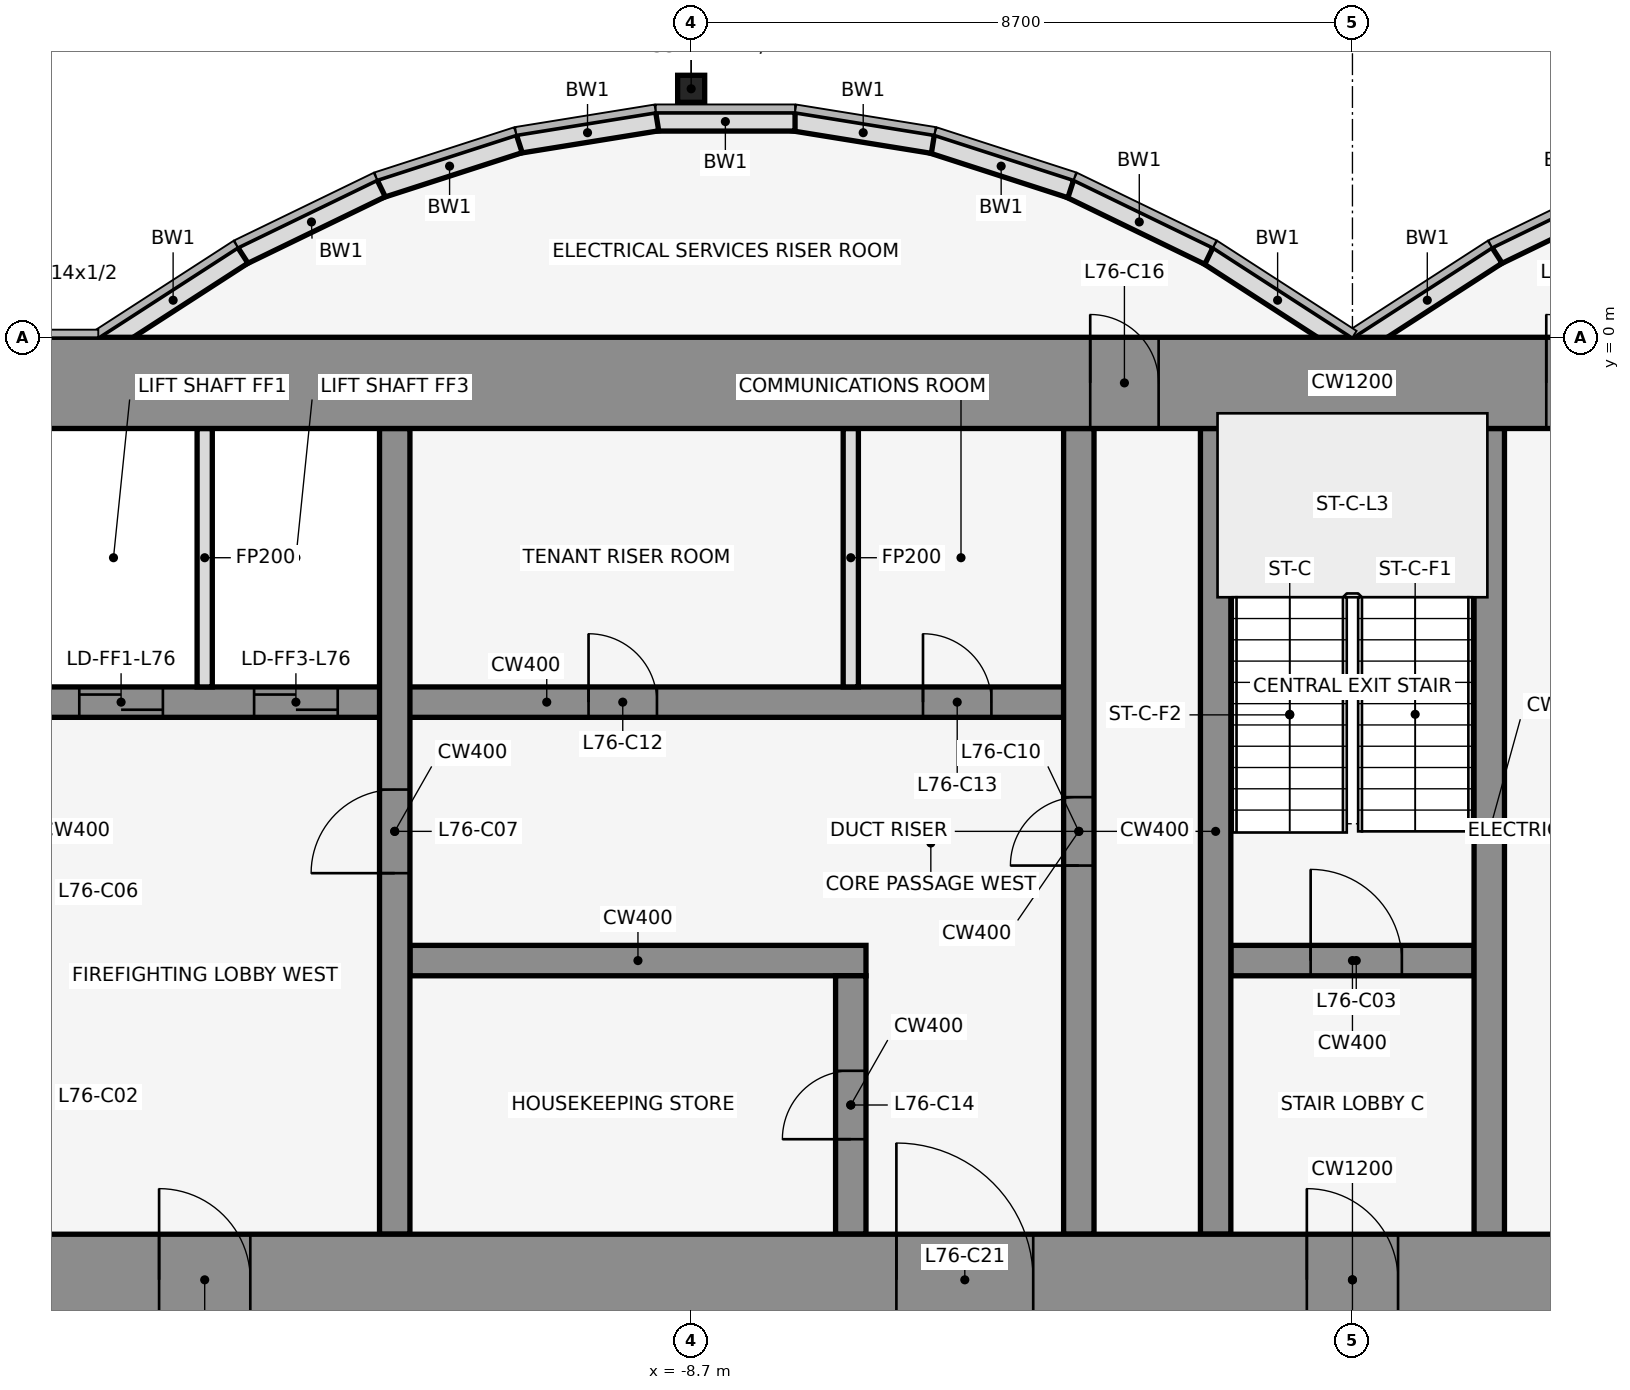
"""IFC4 building model, lengths in metres.
Left out: names, types, materials, properties, quantities, classifications, styles, units other than length and angle.
Written with IfcOpenShell. Run it as: python <this file> out.ifc"""

import sys

from ifc_helpers import new_model, si_unit, direction, frame, frame_2d, origin, origin_2d, place, context, subcontext, project, spatial, rectangle, hollow_rectangle, extrude, element, fill, save


model = new_model("IFC4")
c1 = context("Model", 3, precision=1e-05, world=origin(), true_north=direction((0.0, 1.0)))
c2 = subcontext(c1, "Body", "Model", "MODEL_VIEW")
j1 = project(units=[si_unit("LENGTHUNIT", "METRE"), si_unit("PLANEANGLEUNIT", "RADIAN")], contexts=[c1])
p1 = place(None, origin())
s1 = spatial("IfcSite", under=j1, at=p1, CompositionType="ELEMENT")
p2 = place(p1, origin())
s2 = spatial("IfcBuilding", under=s1, at=p2, CompositionType="ELEMENT")
p3 = place(p2, frame((0.0, 0.0, 338.0)))
s3 = spatial("IfcBuildingStorey", under=s2, at=p3, CompositionType="ELEMENT", Elevation=338.0)
p4 = place(p3, frame((-8.7, 3.269, 0.0), z_axis=(0.0, 0.0, 1.0), x_axis=(1.0, 0.0, 0.0)))
e1 = element("IfcColumn", 1, at=p4, inside=s3, PredefinedType="COLUMN", context=c2, shape_type="SweptSolid", body=[
    extrude(hollow_rectangle(XDim=0.356, YDim=0.356, WallThickness=0.012, at=origin_2d()), origin(), (0.0, 0.0, 1.0), 4.5),
])
p5 = place(p3, frame((3.721, 1.962, 0.0), z_axis=(0.0, 0.0, 1.0), x_axis=(-0.89982408427, -0.436252928206, 0.0)))
e2 = element("IfcWall", 2, at=p5, inside=s3, PredefinedType="STANDARD", context=c2, shape_type="SweptSolid", body=[
    extrude(rectangle(XDim=2.038, YDim=0.25, at=frame_2d((1.019, 0.0))), origin(), (0.0, 0.0, 1.0), 4.3),
])
for number, where, z_axis, x_axis in (
    (3, (1.901, 1.08, 0.0), (0.0, 0.0, 1.0), (-0.84, -0.543, 0.0)),
    (4, (-0.068, -0.105, 0.0), (0.0, 0.0, 1.0), (-0.84, 0.543, 0.0)),
):
    element("IfcWall", number, at=place(p3, frame(where, z_axis=z_axis, x_axis=x_axis)), inside=s3, PredefinedType="STANDARD", context=c2, shape_type="SweptSolid", body=[
        extrude(rectangle(XDim=2.183, YDim=0.25, at=frame_2d((1.091, 0.0))), origin(), (0.0, 0.0, 1.0), 4.3),
    ])
p6 = place(p3, frame((-1.888, 1.073, 0.0), z_axis=(0.0, 0.0, 1.0), x_axis=(-0.89982408427, 0.436252928206, 0.0)))
e5 = element("IfcWall", 5, at=p6, inside=s3, PredefinedType="STANDARD", context=c2, shape_type="SweptSolid", body=[
    extrude(rectangle(XDim=2.038, YDim=0.25, at=frame_2d((1.019, 0.0))), origin(), (0.0, 0.0, 1.0), 4.3),
])
p7 = place(p3, frame((-3.705, 1.955, 0.0), z_axis=(0.0, 0.0, 1.0), x_axis=(-0.951495806175, 0.307661714928, 0.0)))
e6 = element("IfcWall", 6, at=p7, inside=s3, PredefinedType="STANDARD", context=c2, shape_type="SweptSolid", body=[
    extrude(rectangle(XDim=1.927, YDim=0.25, at=frame_2d((0.963, 0.0))), origin(), (0.0, 0.0, 1.0), 4.3),
])
p8 = place(p3, frame((-5.52, 2.543, 0.0), z_axis=(0.0, 0.0, 1.0), x_axis=(-0.987181718931, 0.159600293885, 0.0)))
e7 = element("IfcWall", 7, at=p8, inside=s3, PredefinedType="STANDARD", context=c2, shape_type="SweptSolid", body=[
    extrude(rectangle(XDim=1.857, YDim=0.25, at=frame_2d((0.929, 0.0))), origin(), (0.0, 0.0, 1.0), 4.3),
])
p9 = place(p3, frame((-7.333, 2.838, 0.0), z_axis=(0.0, 0.0, 1.0), x_axis=(-1.0, 0.0, 0.0)))
e8 = element("IfcWall", 8, at=p9, inside=s3, PredefinedType="STANDARD", context=c2, shape_type="SweptSolid", body=[
    extrude(rectangle(XDim=1.833, YDim=0.25, at=frame_2d((0.917, 0.0))), origin(), (0.0, 0.0, 1.0), 4.3),
])
p10 = place(p3, frame((-9.147, 2.84, 0.0), z_axis=(0.0, 0.0, 1.0), x_axis=(-0.987181718931, -0.159600293885, 0.0)))
e9 = element("IfcWall", 9, at=p10, inside=s3, PredefinedType="STANDARD", context=c2, shape_type="SweptSolid", body=[
    extrude(rectangle(XDim=1.857, YDim=0.25, at=frame_2d((0.929, 0.0))), origin(), (0.0, 0.0, 1.0), 4.3),
])
p11 = place(p3, frame((-10.962, 2.548, 0.0), z_axis=(0.0, 0.0, 1.0), x_axis=(-0.951495806175, -0.307661714928, 0.0)))
e10 = element("IfcWall", 10, at=p11, inside=s3, PredefinedType="STANDARD", context=c2, shape_type="SweptSolid", body=[
    extrude(rectangle(XDim=1.927, YDim=0.25, at=frame_2d((0.963, 0.0))), origin(), (0.0, 0.0, 1.0), 4.3),
])
p12 = place(p3, frame((-12.779, 1.962, 0.0), z_axis=(0.0, 0.0, 1.0), x_axis=(-0.89982408427, -0.436252928206, 0.0)))
e11 = element("IfcWall", 11, at=p12, inside=s3, PredefinedType="STANDARD", context=c2, shape_type="SweptSolid", body=[
    extrude(rectangle(XDim=2.038, YDim=0.25, at=frame_2d((1.019, 0.0))), origin(), (0.0, 0.0, 1.0), 4.3),
])
p13 = place(p3, frame((-14.599, 1.08, 0.0), z_axis=(0.0, 0.0, 1.0), x_axis=(-0.83981312244, -0.542875602121, 0.0)))
e12 = element("IfcWall", 12, at=p13, inside=s3, PredefinedType="STANDARD", context=c2, shape_type="SweptSolid", body=[
    extrude(rectangle(XDim=2.183, YDim=0.25, at=frame_2d((1.091, 0.0))), origin(), (0.0, 0.0, 1.0), 4.3),
])
p14 = place(p3, frame((-12.4, -8.2, 0.0), z_axis=(0.0, 0.0, 1.0), x_axis=(1.0, 0.0, 0.0)))
e13 = element("IfcWall", 13, at=p14, inside=s3, PredefinedType="SHEAR", context=c2, shape_type="SweptSolid", body=[
    extrude(rectangle(XDim=6.0, YDim=0.4, at=frame_2d((3.0, 0.0))), origin(), (0.0, 0.0, 1.0), 4.5),
])
p15 = place(p3, frame((-1.6, -8.2, 0.0), z_axis=(0.0, 0.0, 1.0), x_axis=(1.0, 0.0, 0.0)))
e14 = element("IfcWall", 14, at=p15, inside=s3, PredefinedType="SHEAR", context=c2, shape_type="SweptSolid", body=[
    extrude(rectangle(XDim=3.2, YDim=0.4, at=frame_2d((1.6, 0.0))), origin(), (0.0, 0.0, 1.0), 4.5),
])
p16 = place(p15, frame((1.05, 0.0, 0.0)))
e15 = element("IfcOpeningElement", 15, at=p16, cuts=e14, PredefinedType="OPENING", context=c2, shape_type="SweptSolid", body=[
    extrude(rectangle(XDim=1.2, YDim=2.1, at=frame_2d((0.6, 1.05))), frame((0.0, 0.212, 0.0), z_axis=(0.0, -1.0, 0.0), x_axis=(1.0, 0.0, 0.0)), (0.0, 0.0, 1.0), 0.424),
])
p17 = place(p3, frame((-17.4, -4.8, 0.0), z_axis=(0.0, 0.0, 1.0), x_axis=(1.0, 0.0, 0.0)))
e16 = element("IfcWall", 16, at=p17, inside=s3, PredefinedType="SHEAR", context=c2, shape_type="SweptSolid", body=[
    extrude(rectangle(XDim=13.6, YDim=0.4, at=frame_2d((6.8, 0.0))), origin(), (0.0, 0.0, 1.0), 4.5),
])
p18 = place(p17, frame((0.65, 0.0, 0.0)))
e17 = element("IfcOpeningElement", 17, at=p18, cuts=e16, PredefinedType="OPENING", context=c2, shape_type="SweptSolid", body=[
    extrude(rectangle(XDim=1.1, YDim=2.1, at=frame_2d((0.55, 1.05))), frame((0.0, 0.212, 0.0), z_axis=(0.0, -1.0, 0.0), x_axis=(1.0, 0.0, 0.0)), (0.0, 0.0, 1.0), 0.424),
])
p19 = place(p17, frame((2.95, 0.0, 0.0)))
e18 = element("IfcOpeningElement", 18, at=p19, cuts=e16, PredefinedType="OPENING", context=c2, shape_type="SweptSolid", body=[
    extrude(rectangle(XDim=1.1, YDim=2.1, at=frame_2d((0.55, 1.05))), frame((0.0, 0.212, 0.0), z_axis=(0.0, -1.0, 0.0), x_axis=(1.0, 0.0, 0.0)), (0.0, 0.0, 1.0), 0.424),
])
p20 = place(p17, frame((7.35, 0.0, 0.0)))
e19 = element("IfcOpeningElement", 19, at=p20, cuts=e16, PredefinedType="OPENING", context=c2, shape_type="SweptSolid", body=[
    extrude(rectangle(XDim=0.9, YDim=2.1, at=frame_2d((0.45, 1.05))), frame((0.0, 0.212, 0.0), z_axis=(0.0, -1.0, 0.0), x_axis=(1.0, 0.0, 0.0)), (0.0, 0.0, 1.0), 0.424),
])
p21 = place(p17, frame((11.75, 0.0, 0.0)))
e20 = element("IfcOpeningElement", 20, at=p21, cuts=e16, PredefinedType="OPENING", context=c2, shape_type="SweptSolid", body=[
    extrude(rectangle(XDim=0.9, YDim=2.1, at=frame_2d((0.45, 1.05))), frame((0.0, 0.212, 0.0), z_axis=(0.0, -1.0, 0.0), x_axis=(1.0, 0.0, 0.0)), (0.0, 0.0, 1.0), 0.424),
])
p22 = place(p3, frame((-15.1, -4.6, 0.0), z_axis=(0.0, 0.0, 1.0), x_axis=(0.0, 1.0, 0.0)))
e21 = element("IfcWall", 21, at=p22, inside=s3, PredefinedType="PARTITIONING", context=c2, shape_type="SweptSolid", body=[
    extrude(rectangle(XDim=3.4, YDim=0.2, at=frame_2d((1.7, 0.0))), origin(), (0.0, 0.0, 1.0), 3.368),
])
p23 = place(p3, frame((-12.6, -11.8, 0.0), z_axis=(0.0, 0.0, 1.0), x_axis=(0.0, 1.0, 0.0)))
e22 = element("IfcWall", 22, at=p23, inside=s3, PredefinedType="SHEAR", context=c2, shape_type="SweptSolid", body=[
    extrude(rectangle(XDim=10.6, YDim=0.4, at=frame_2d((5.3, 0.0))), origin(), (0.0, 0.0, 1.0), 4.5),
])
p24 = place(p23, frame((4.75, 0.0, 0.0)))
e23 = element("IfcOpeningElement", 23, at=p24, cuts=e22, PredefinedType="OPENING", context=c2, shape_type="SweptSolid", body=[
    extrude(rectangle(XDim=1.1, YDim=2.1, at=frame_2d((0.55, 1.05))), frame((0.0, 0.212, 0.0), z_axis=(0.0, -1.0, 0.0), x_axis=(1.0, 0.0, 0.0)), (0.0, 0.0, 1.0), 0.424),
])
p25 = place(p3, frame((-6.6, -11.8, 0.0), z_axis=(0.0, 0.0, 1.0), x_axis=(0.0, 1.0, 0.0)))
e24 = element("IfcWall", 24, at=p25, inside=s3, PredefinedType="SHEAR", context=c2, shape_type="SweptSolid", body=[
    extrude(rectangle(XDim=3.4, YDim=0.4, at=frame_2d((1.7, 0.0))), origin(), (0.0, 0.0, 1.0), 4.5),
])
p26 = place(p25, frame((1.25, 0.0, 0.0)))
e25 = element("IfcOpeningElement", 25, at=p26, cuts=e24, PredefinedType="OPENING", context=c2, shape_type="SweptSolid", body=[
    extrude(rectangle(XDim=0.9, YDim=2.1, at=frame_2d((0.45, 1.05))), frame((0.0, 0.212, 0.0), z_axis=(0.0, -1.0, 0.0), x_axis=(1.0, 0.0, 0.0)), (0.0, 0.0, 1.0), 0.424),
])
p27 = place(p3, frame((-6.6, -4.6, 0.0), z_axis=(0.0, 0.0, 1.0), x_axis=(0.0, 1.0, 0.0)))
e26 = element("IfcWall", 26, at=p27, inside=s3, PredefinedType="PARTITIONING", context=c2, shape_type="SweptSolid", body=[
    extrude(rectangle(XDim=3.4, YDim=0.2, at=frame_2d((1.7, 0.0))), origin(), (0.0, 0.0, 1.0), 3.368),
])
p28 = place(p3, frame((-3.6, -11.8, 0.0), z_axis=(0.0, 0.0, 1.0), x_axis=(0.0, 1.0, 0.0)))
e27 = element("IfcWall", 27, at=p28, inside=s3, PredefinedType="SHEAR", context=c2, shape_type="SweptSolid", body=[
    extrude(rectangle(XDim=10.6, YDim=0.4, at=frame_2d((5.3, 0.0))), origin(), (0.0, 0.0, 1.0), 4.5),
])
p29 = place(p28, frame((4.85, 0.0, 0.0)))
e28 = element("IfcOpeningElement", 28, at=p29, cuts=e27, PredefinedType="OPENING", context=c2, shape_type="SweptSolid", body=[
    extrude(rectangle(XDim=0.9, YDim=2.1, at=frame_2d((0.45, 1.05))), frame((0.0, 0.212, 0.0), z_axis=(0.0, -1.0, 0.0), x_axis=(1.0, 0.0, 0.0)), (0.0, 0.0, 1.0), 0.424),
])
for number, where, z_axis, x_axis in (
    (29, (-1.8, -11.8, 0.0), (0.0, 0.0, 1.0), (0.0, 1.0, 0.0)),
    (30, (1.8, -11.8, 0.0), (0.0, 0.0, 1.0), (0.0, 1.0, 0.0)),
):
    element("IfcWall", number, at=place(p3, frame(where, z_axis=z_axis, x_axis=x_axis)), inside=s3, PredefinedType="SHEAR", context=c2, shape_type="SweptSolid", body=[
        extrude(rectangle(XDim=10.6, YDim=0.4, at=frame_2d((5.3, 0.0))), origin(), (0.0, 0.0, 1.0), 4.5),
    ])
p30 = place(p3, frame((-22.0, -0.6, 0.0), z_axis=(0.0, 0.0, 1.0), x_axis=(1.0, 0.0, 0.0)))
e31 = element("IfcWall", 31, at=p30, inside=s3, PredefinedType="SHEAR", context=c2, shape_type="SweptSolid", body=[
    extrude(rectangle(XDim=44.0, YDim=1.2, at=frame_2d((22.0, 0.0))), origin(), (0.0, 0.0, 1.0), 4.5),
])
p31 = place(p30, frame((18.55, 0.0, 0.0)))
e32 = element("IfcOpeningElement", 32, at=p31, cuts=e31, PredefinedType="OPENING", context=c2, shape_type="SweptSolid", body=[
    extrude(rectangle(XDim=0.9, YDim=2.1, at=frame_2d((0.45, 1.05))), frame((0.0, 0.612, 0.0), z_axis=(0.0, -1.0, 0.0), x_axis=(1.0, 0.0, 0.0)), (0.0, 0.0, 1.0), 1.224),
])
p32 = place(p30, frame((24.55, 0.0, 0.0)))
e33 = element("IfcOpeningElement", 33, at=p32, cuts=e31, PredefinedType="OPENING", context=c2, shape_type="SweptSolid", body=[
    extrude(rectangle(XDim=0.9, YDim=2.1, at=frame_2d((0.45, 1.05))), frame((0.0, 0.612, 0.0), z_axis=(0.0, -1.0, 0.0), x_axis=(1.0, 0.0, 0.0)), (0.0, 0.0, 1.0), 1.224),
])
p33 = place(p3, frame((-22.0, -12.4, 0.0), z_axis=(0.0, 0.0, 1.0), x_axis=(1.0, 0.0, 0.0)))
e34 = element("IfcWall", 34, at=p33, inside=s3, PredefinedType="SHEAR", context=c2, shape_type="SweptSolid", body=[
    extrude(rectangle(XDim=44.0, YDim=1.2, at=frame_2d((22.0, 0.0))), origin(), (0.0, 0.0, 1.0), 4.5),
])
p34 = place(p33, frame((2.2, 0.0, 0.0)))
e35 = element("IfcOpeningElement", 35, at=p34, cuts=e34, PredefinedType="OPENING", context=c2, shape_type="SweptSolid", body=[
    extrude(rectangle(XDim=1.2, YDim=2.1, at=frame_2d((0.6, 1.05))), frame((0.0, 0.612, 0.0), z_axis=(0.0, -1.0, 0.0), x_axis=(1.0, 0.0, 0.0)), (0.0, 0.0, 1.0), 1.224),
])
p35 = place(p33, frame((21.4, 0.0, 0.0)))
e36 = element("IfcOpeningElement", 36, at=p35, cuts=e34, PredefinedType="OPENING", context=c2, shape_type="SweptSolid", body=[
    extrude(rectangle(XDim=1.2, YDim=2.1, at=frame_2d((0.6, 1.05))), frame((0.0, 0.612, 0.0), z_axis=(0.0, -1.0, 0.0), x_axis=(1.0, 0.0, 0.0)), (0.0, 0.0, 1.0), 1.224),
])
p36 = place(p33, frame((40.6, 0.0, 0.0)))
e37 = element("IfcOpeningElement", 37, at=p36, cuts=e34, PredefinedType="OPENING", context=c2, shape_type="SweptSolid", body=[
    extrude(rectangle(XDim=1.2, YDim=2.1, at=frame_2d((0.6, 1.05))), frame((0.0, 0.612, 0.0), z_axis=(0.0, -1.0, 0.0), x_axis=(1.0, 0.0, 0.0)), (0.0, 0.0, 1.0), 1.224),
])
p37 = place(p33, frame((16.0, 0.0, 0.0)))
e38 = element("IfcOpeningElement", 38, at=p37, cuts=e34, PredefinedType="OPENING", context=c2, shape_type="SweptSolid", body=[
    extrude(rectangle(XDim=1.8, YDim=2.1, at=frame_2d((0.9, 1.05))), frame((0.0, 0.612, 0.0), z_axis=(0.0, -1.0, 0.0), x_axis=(1.0, 0.0, 0.0)), (0.0, 0.0, 1.0), 1.224),
])
p38 = place(p33, frame((6.3, 0.0, 0.0)))
e39 = element("IfcOpeningElement", 39, at=p38, cuts=e34, PredefinedType="OPENING", context=c2, shape_type="SweptSolid", body=[
    extrude(rectangle(XDim=1.2, YDim=2.1, at=frame_2d((0.6, 1.05))), frame((0.0, 0.612, 0.0), z_axis=(0.0, -1.0, 0.0), x_axis=(1.0, 0.0, 0.0)), (0.0, 0.0, 1.0), 1.224),
])
p39 = place(p33, frame((26.2, 0.0, 0.0)))
e40 = element("IfcOpeningElement", 40, at=p39, cuts=e34, PredefinedType="OPENING", context=c2, shape_type="SweptSolid", body=[
    extrude(rectangle(XDim=1.8, YDim=2.1, at=frame_2d((0.9, 1.05))), frame((0.0, 0.612, 0.0), z_axis=(0.0, -1.0, 0.0), x_axis=(1.0, 0.0, 0.0)), (0.0, 0.0, 1.0), 1.224),
])
p40 = place(p33, frame((36.5, 0.0, 0.0)))
e41 = element("IfcOpeningElement", 41, at=p40, cuts=e34, PredefinedType="OPENING", context=c2, shape_type="SweptSolid", body=[
    extrude(rectangle(XDim=1.2, YDim=2.1, at=frame_2d((0.6, 1.05))), frame((0.0, 0.612, 0.0), z_axis=(0.0, -1.0, 0.0), x_axis=(1.0, 0.0, 0.0)), (0.0, 0.0, 1.0), 1.224),
])
p41 = place(p16, origin())
e42 = element("IfcDoor", 42, at=p41, inside=s3, OperationType="SINGLE_SWING_LEFT", PredefinedType="DOOR", context=c2, shape_type="SweptSolid", body=[
    extrude(rectangle(XDim=1.2, YDim=2.1, at=frame_2d((0.6, 1.05))), frame((0.0, 0.025, 0.0), z_axis=(0.0, -1.0, 0.0), x_axis=(1.0, 0.0, 0.0)), (0.0, 0.0, 1.0), 0.05),
])
fill(e15, e42)
p42 = place(p18, origin())
e43 = element("IfcDoor", 43, at=p42, inside=s3, OperationType="DOUBLE_DOOR_SLIDING", PredefinedType="DOOR", context=c2, shape_type="SweptSolid", body=[
    extrude(rectangle(XDim=1.1, YDim=2.1, at=frame_2d((0.55, 1.05))), frame((0.0, 0.025, 0.0), z_axis=(0.0, -1.0, 0.0), x_axis=(1.0, 0.0, 0.0)), (0.0, 0.0, 1.0), 0.05),
])
fill(e17, e43)
p43 = place(p19, origin())
e44 = element("IfcDoor", 44, at=p43, inside=s3, OperationType="DOUBLE_DOOR_SLIDING", PredefinedType="DOOR", context=c2, shape_type="SweptSolid", body=[
    extrude(rectangle(XDim=1.1, YDim=2.1, at=frame_2d((0.55, 1.05))), frame((0.0, 0.025, 0.0), z_axis=(0.0, -1.0, 0.0), x_axis=(1.0, 0.0, 0.0)), (0.0, 0.0, 1.0), 0.05),
])
fill(e18, e44)
p44 = place(p24, origin())
e45 = element("IfcDoor", 45, at=p44, inside=s3, OperationType="SINGLE_SWING_LEFT", PredefinedType="DOOR", context=c2, shape_type="SweptSolid", body=[
    extrude(rectangle(XDim=1.1, YDim=2.1, at=frame_2d((0.55, 1.05))), frame((0.0, 0.025, 0.0), z_axis=(0.0, -1.0, 0.0), x_axis=(1.0, 0.0, 0.0)), (0.0, 0.0, 1.0), 0.05),
])
fill(e23, e45)
p45 = place(p29, frame((0.9, 0.0, 0.0), z_axis=(0.0, 0.0, 1.0), x_axis=(-1.0, 0.0, 0.0)))
e46 = element("IfcDoor", 46, at=p45, inside=s3, OperationType="SINGLE_SWING_LEFT", PredefinedType="DOOR", context=c2, shape_type="SweptSolid", body=[
    extrude(rectangle(XDim=0.9, YDim=2.1, at=frame_2d((0.45, 1.05))), frame((0.0, 0.025, 0.0), z_axis=(0.0, -1.0, 0.0), x_axis=(1.0, 0.0, 0.0)), (0.0, 0.0, 1.0), 0.05),
])
fill(e28, e46)
p46 = place(p20, origin())
e47 = element("IfcDoor", 47, at=p46, inside=s3, OperationType="SINGLE_SWING_RIGHT", PredefinedType="DOOR", context=c2, shape_type="SweptSolid", body=[
    extrude(rectangle(XDim=0.9, YDim=2.1, at=frame_2d((0.45, 1.05))), frame((0.0, 0.025, 0.0), z_axis=(0.0, -1.0, 0.0), x_axis=(1.0, 0.0, 0.0)), (0.0, 0.0, 1.0), 0.05),
])
fill(e19, e47)
p47 = place(p21, origin())
e48 = element("IfcDoor", 48, at=p47, inside=s3, OperationType="SINGLE_SWING_LEFT", PredefinedType="DOOR", context=c2, shape_type="SweptSolid", body=[
    extrude(rectangle(XDim=0.9, YDim=2.1, at=frame_2d((0.45, 1.05))), frame((0.0, 0.025, 0.0), z_axis=(0.0, -1.0, 0.0), x_axis=(1.0, 0.0, 0.0)), (0.0, 0.0, 1.0), 0.05),
])
fill(e20, e48)
p48 = place(p26, origin())
e49 = element("IfcDoor", 49, at=p48, inside=s3, OperationType="SINGLE_SWING_RIGHT", PredefinedType="DOOR", context=c2, shape_type="SweptSolid", body=[
    extrude(rectangle(XDim=0.9, YDim=2.1, at=frame_2d((0.45, 1.05))), frame((0.0, 0.025, 0.0), z_axis=(0.0, -1.0, 0.0), x_axis=(1.0, 0.0, 0.0)), (0.0, 0.0, 1.0), 0.05),
])
fill(e25, e49)
p49 = place(p31, origin())
e50 = element("IfcDoor", 50, at=p49, inside=s3, OperationType="SINGLE_SWING_LEFT", PredefinedType="DOOR", context=c2, shape_type="SweptSolid", body=[
    extrude(rectangle(XDim=0.9, YDim=2.1, at=frame_2d((0.45, 1.05))), frame((0.0, 0.025, 0.0), z_axis=(0.0, -1.0, 0.0), x_axis=(1.0, 0.0, 0.0)), (0.0, 0.0, 1.0), 0.05),
])
fill(e32, e50)
p50 = place(p32, origin())
e51 = element("IfcDoor", 51, at=p50, inside=s3, OperationType="SINGLE_SWING_LEFT", PredefinedType="DOOR", context=c2, shape_type="SweptSolid", body=[
    extrude(rectangle(XDim=0.9, YDim=2.1, at=frame_2d((0.45, 1.05))), frame((0.0, 0.025, 0.0), z_axis=(0.0, -1.0, 0.0), x_axis=(1.0, 0.0, 0.0)), (0.0, 0.0, 1.0), 0.05),
])
fill(e33, e51)
p51 = place(p35, frame((1.2, 0.0, 0.0), z_axis=(0.0, 0.0, 1.0), x_axis=(-1.0, 0.0, 0.0)))
e52 = element("IfcDoor", 52, at=p51, inside=s3, OperationType="SINGLE_SWING_RIGHT", PredefinedType="DOOR", context=c2, shape_type="SweptSolid", body=[
    extrude(rectangle(XDim=1.2, YDim=2.1, at=frame_2d((0.6, 1.05))), frame((0.0, 0.025, 0.0), z_axis=(0.0, -1.0, 0.0), x_axis=(1.0, 0.0, 0.0)), (0.0, 0.0, 1.0), 0.05),
])
fill(e36, e52)
p52 = place(p37, origin())
e53 = element("IfcDoor", 53, at=p52, inside=s3, OperationType="SINGLE_SWING_LEFT", PredefinedType="DOOR", context=c2, shape_type="SweptSolid", body=[
    extrude(rectangle(XDim=1.8, YDim=2.1, at=frame_2d((0.9, 1.05))), frame((0.0, 0.025, 0.0), z_axis=(0.0, -1.0, 0.0), x_axis=(1.0, 0.0, 0.0)), (0.0, 0.0, 1.0), 0.05),
])
fill(e38, e53)
p53 = place(p38, frame((1.2, 0.0, 0.0), z_axis=(0.0, 0.0, 1.0), x_axis=(-1.0, 0.0, 0.0)))
e54 = element("IfcDoor", 54, at=p53, inside=s3, OperationType="SINGLE_SWING_RIGHT", PredefinedType="DOOR", context=c2, shape_type="SweptSolid", body=[
    extrude(rectangle(XDim=1.2, YDim=2.1, at=frame_2d((0.6, 1.05))), frame((0.0, 0.025, 0.0), z_axis=(0.0, -1.0, 0.0), x_axis=(1.0, 0.0, 0.0)), (0.0, 0.0, 1.0), 0.05),
])
fill(e39, e54)
save(model, sys.argv[1])
